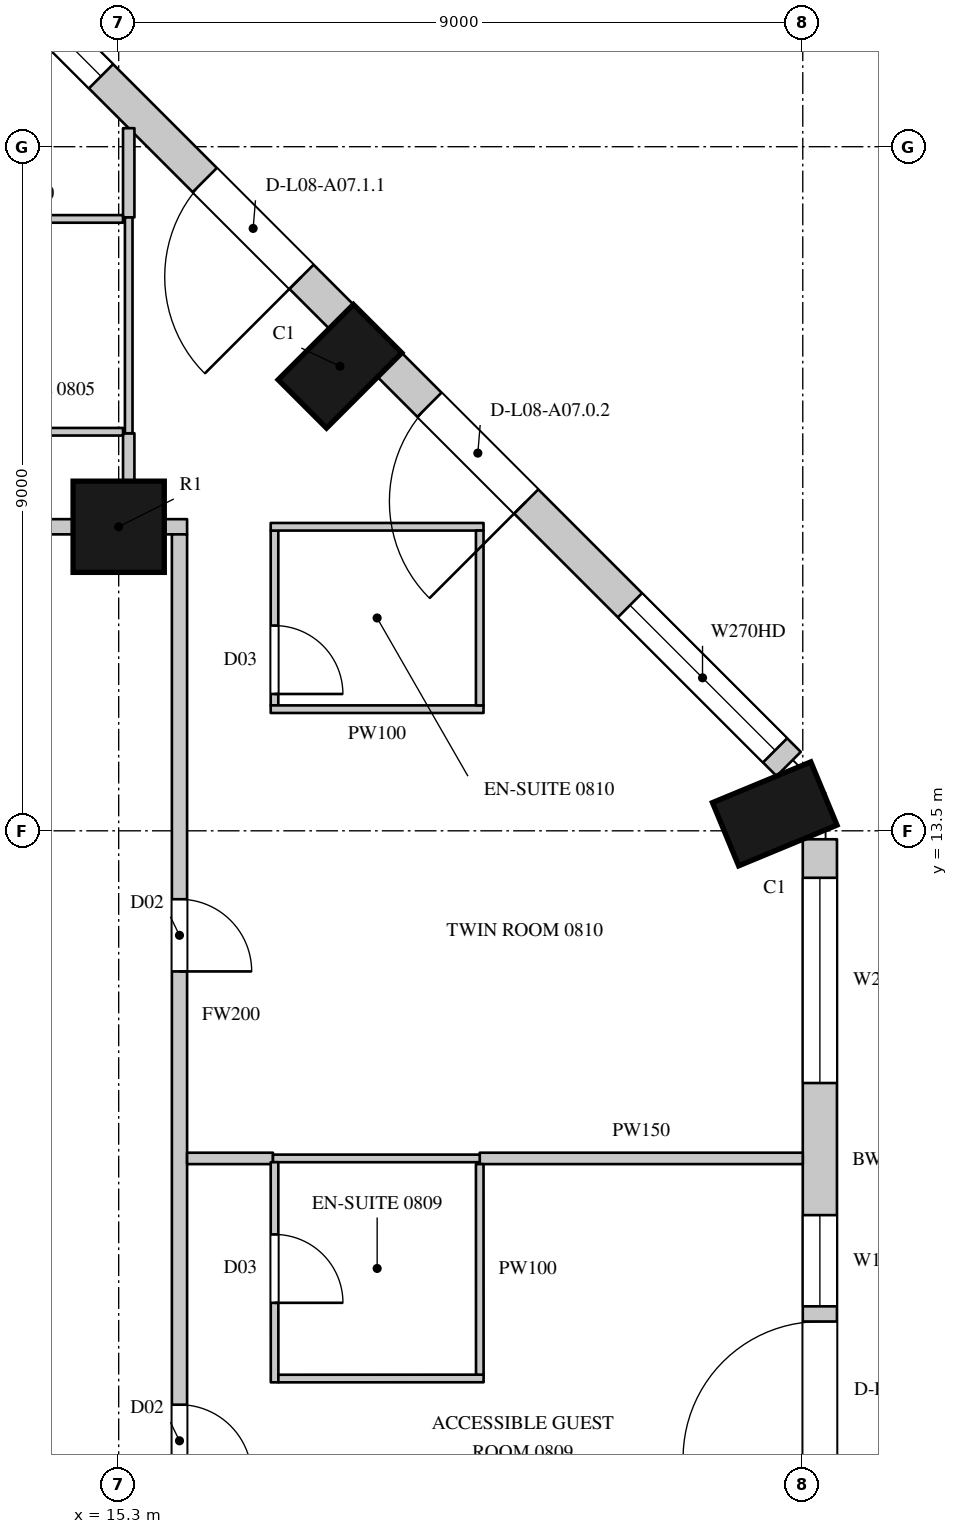
"""IFC4 building model, lengths in metres.
Left out: names, types, materials, properties, quantities, classifications, styles, units other than length and angle.
Written with IfcOpenShell. Run it as: python <this file> out.ifc"""

import sys

from ifc_helpers import new_model, si_unit, direction, frame, frame_2d, origin, origin_2d, place, context, subcontext, project, spatial, rectangle, circle, extrude, element, fill, save


model = new_model("IFC4")
c1 = context("Model", 3, precision=1e-05, world=origin(), true_north=direction((0.0, 1.0)))
c2 = subcontext(c1, "Body", "Model", "MODEL_VIEW")
j1 = project(units=[si_unit("LENGTHUNIT", "METRE"), si_unit("PLANEANGLEUNIT", "RADIAN")], contexts=[c1])
p1 = place(None, origin())
s1 = spatial("IfcSite", under=j1, at=p1, CompositionType="ELEMENT")
p2 = place(p1, origin())
s2 = spatial("IfcBuilding", under=s1, at=p2, CompositionType="ELEMENT")
p3 = place(p2, frame((0.0, 0.0, 59.1)))
s3 = spatial("IfcBuildingStorey", under=s2, at=p3, CompositionType="ELEMENT", Elevation=59.1)
for number, where, z_axis, x_axis in (
    (1, (23.931, 13.723, 0.0), (0.0, 0.0, 1.0), (-0.383, 0.924, 0.0)),
    (2, (18.211, 19.611, 0.0), (0.0, 0.0, 1.0), (-0.707, 0.707, 0.0)),
):
    element("IfcColumn", number, at=place(p3, frame(where, z_axis=z_axis, x_axis=x_axis)), inside=s3, PredefinedType="COLUMN", context=c2, shape_type="SweptSolid", body=[
        extrude(rectangle(XDim=0.9, YDim=1.4, at=origin_2d()), origin(), (0.0, 0.0, 1.0), 3.6),
    ])
p4 = place(p3, frame((15.3, 17.5, 0.0), z_axis=(0.0, 0.0, 1.0), x_axis=(1.0, 0.0, 0.0)))
e3 = element("IfcColumn", 3, at=p4, inside=s3, PredefinedType="COLUMN", context=c2, shape_type="SweptSolid", body=[
    extrude(circle(Radius=0.6, at=origin_2d()), origin(), (0.0, 0.0, 1.0), 3.6),
])
p5 = place(p3, frame((24.525, 4.95, 0.0), z_axis=(0.0, 0.0, 1.0), x_axis=(0.0, 1.0, 0.0)))
e4 = element("IfcWall", 4, at=p5, inside=s3, PredefinedType="SOLIDWALL", context=c2, shape_type="SweptSolid", body=[
    extrude(rectangle(XDim=8.439, YDim=0.45, at=frame_2d((4.219, 0.0))), origin(), (0.0, 0.0, 1.0), 3.3),
])
p6 = place(p5, frame((0.294, 0.0, 0.0)))
e5 = element("IfcOpeningElement", 5, at=p6, cuts=e4, PredefinedType="OPENING", context=c2, shape_type="SweptSolid", body=[
    extrude(rectangle(XDim=1.8, YDim=2.4, at=frame_2d((0.9, 1.2))), frame((0.0, 0.235, 0.0), z_axis=(0.0, -1.0, 0.0), x_axis=(1.0, 0.0, 0.0)), (0.0, 0.0, 1.0), 0.47),
])
p7 = place(p5, frame((2.294, 0.0, 1.05)))
e6 = element("IfcOpeningElement", 6, at=p7, cuts=e4, PredefinedType="OPENING", context=c2, shape_type="SweptSolid", body=[
    extrude(rectangle(XDim=1.2, YDim=2.0, at=frame_2d((0.6, 1.0))), frame((0.0, 0.235, 0.0), z_axis=(0.0, -1.0, 0.0), x_axis=(1.0, 0.0, 0.0)), (0.0, 0.0, 1.0), 0.47),
])
p8 = place(p5, frame((5.232, 0.0, 1.05)))
e7 = element("IfcOpeningElement", 7, at=p8, cuts=e4, PredefinedType="OPENING", context=c2, shape_type="SweptSolid", body=[
    extrude(rectangle(XDim=2.7, YDim=2.0, at=frame_2d((1.35, 1.0))), frame((0.0, 0.235, 0.0), z_axis=(0.0, -1.0, 0.0), x_axis=(1.0, 0.0, 0.0)), (0.0, 0.0, 1.0), 0.47),
])
p9 = place(p3, frame((24.115, 14.379, 0.0), z_axis=(0.0, 0.0, 1.0), x_axis=(-0.707106781187, 0.707106781187, 0.0)))
e8 = element("IfcWall", 8, at=p9, inside=s3, PredefinedType="SOLIDWALL", context=c2, shape_type="SweptSolid", body=[
    extrude(rectangle(XDim=7.424, YDim=0.45, at=frame_2d((3.712, 0.0))), origin(), (0.0, 0.0, 1.0), 3.3),
])
p10 = place(p9, frame((0.253, 0.0, 1.05)))
e9 = element("IfcOpeningElement", 9, at=p10, cuts=e8, PredefinedType="OPENING", context=c2, shape_type="SweptSolid", body=[
    extrude(rectangle(XDim=2.7, YDim=2.0, at=frame_2d((1.35, 1.0))), frame((0.0, 0.235, 0.0), z_axis=(0.0, -1.0, 0.0), x_axis=(1.0, 0.0, 0.0)), (0.0, 0.0, 1.0), 0.47),
])
p11 = place(p9, frame((4.884, 0.0, 0.0)))
e10 = element("IfcOpeningElement", 10, at=p11, cuts=e8, PredefinedType="OPENING", context=c2, shape_type="SweptSolid", body=[
    extrude(rectangle(XDim=1.8, YDim=2.4, at=frame_2d((0.9, 1.2))), frame((0.0, 0.235, 0.0), z_axis=(0.0, -1.0, 0.0), x_axis=(1.0, 0.0, 0.0)), (0.0, 0.0, 1.0), 0.47),
])
p12 = place(p3, frame((18.229, 20.265, 0.0), z_axis=(0.0, 0.0, 1.0), x_axis=(-0.707106781187, 0.707106781187, 0.0)))
e11 = element("IfcWall", 11, at=p12, inside=s3, PredefinedType="SOLIDWALL", context=c2, shape_type="SweptSolid", body=[
    extrude(rectangle(XDim=7.424, YDim=0.45, at=frame_2d((3.712, 0.0))), origin(), (0.0, 0.0, 1.0), 3.3),
])
p13 = place(p12, frame((0.74, 0.0, 0.0)))
e12 = element("IfcOpeningElement", 12, at=p13, cuts=e11, PredefinedType="OPENING", context=c2, shape_type="SweptSolid", body=[
    extrude(rectangle(XDim=1.8, YDim=2.4, at=frame_2d((0.9, 1.2))), frame((0.0, 0.235, 0.0), z_axis=(0.0, -1.0, 0.0), x_axis=(1.0, 0.0, 0.0)), (0.0, 0.0, 1.0), 0.47),
])
p14 = place(p12, frame((4.471, 0.0, 1.05)))
e13 = element("IfcOpeningElement", 13, at=p14, cuts=e11, PredefinedType="OPENING", context=c2, shape_type="SweptSolid", body=[
    extrude(rectangle(XDim=2.7, YDim=2.0, at=frame_2d((1.35, 1.0))), frame((0.0, 0.235, 0.0), z_axis=(0.0, -1.0, 0.0), x_axis=(1.0, 0.0, 0.0)), (0.0, 0.0, 1.0), 0.47),
])
p15 = place(p3, frame((23.15, 16.864, 0.0), z_axis=(0.0, 0.0, 1.0), x_axis=(-0.707106781187, 0.707106781187, 0.0)))
e14 = element("IfcWall", 14, at=p15, inside=s3, PredefinedType="SOLIDWALL", context=c2, shape_type="SweptSolid", body=[
    extrude(rectangle(XDim=1.445, YDim=0.45, at=frame_2d((0.722, 0.0))), origin(), (0.0, 0.0, 1.0), 0.6),
])
p16 = place(p3, frame((19.937, 20.078, 0.0), z_axis=(0.0, 0.0, 1.0), x_axis=(-0.707106781187, 0.707106781187, 0.0)))
e15 = element("IfcWall", 15, at=p16, inside=s3, PredefinedType="SOLIDWALL", context=c2, shape_type="SweptSolid", body=[
    extrude(rectangle(XDim=1.781, YDim=0.45, at=frame_2d((0.89, 0.0))), origin(), (0.0, 0.0, 1.0), 0.6),
])
p17 = place(p3, frame((16.486, 23.529, 0.0), z_axis=(0.0, 0.0, 1.0), x_axis=(-0.707022305137, 0.707191247145, 0.0)))
e16 = element("IfcWall", 16, at=p17, inside=s3, PredefinedType="SOLIDWALL", context=c2, shape_type="SweptSolid", body=[
    extrude(rectangle(XDim=1.445, YDim=0.45, at=frame_2d((0.723, 0.0))), origin(), (0.0, 0.0, 1.0), 0.6),
])
p18 = place(p3, frame((6.9, 17.5, 0.0), z_axis=(0.0, 0.0, 1.0), x_axis=(1.0, 0.0, 0.0)))
e17 = element("IfcWall", 17, at=p18, inside=s3, PredefinedType="PARTITIONING", context=c2, shape_type="SweptSolid", body=[
    extrude(rectangle(XDim=7.8, YDim=0.2, at=frame_2d((3.9, 0.0))), origin(), (0.0, 0.0, 1.0), 2.75),
])
p19 = place(p18, frame((1.45, 0.0, 0.0)))
e18 = element("IfcOpeningElement", 18, at=p19, cuts=e17, PredefinedType="OPENING", context=c2, shape_type="SweptSolid", body=[
    extrude(rectangle(XDim=1.1, YDim=2.4, at=frame_2d((0.55, 1.2))), frame((0.0, 0.11, 0.0), z_axis=(0.0, -1.0, 0.0), x_axis=(1.0, 0.0, 0.0)), (0.0, 0.0, 1.0), 0.22),
])
p20 = place(p3, frame((15.9, 17.5, 0.0), z_axis=(0.0, 0.0, 1.0), x_axis=(1.0, 0.0, 0.0)))
e19 = element("IfcWall", 19, at=p20, inside=s3, PredefinedType="PARTITIONING", context=c2, shape_type="SweptSolid", body=[
    extrude(rectangle(XDim=0.3, YDim=0.2, at=frame_2d((0.15, 0.0))), origin(), (0.0, 0.0, 1.0), 3.3),
])
p21 = place(p3, frame((16.1, 4.75, 0.0), z_axis=(0.0, 0.0, 1.0), x_axis=(0.0, 1.0, 0.0)))
e20 = element("IfcWall", 20, at=p21, inside=s3, PredefinedType="PARTITIONING", context=c2, shape_type="SweptSolid", body=[
    extrude(rectangle(XDim=12.65, YDim=0.2, at=frame_2d((6.325, 0.0))), origin(), (0.0, 0.0, 1.0), 3.3),
])
p22 = place(p21, frame((0.25, 0.0, 0.0)))
e21 = element("IfcOpeningElement", 21, at=p22, cuts=e20, PredefinedType="OPENING", context=c2, shape_type="SweptSolid", body=[
    extrude(rectangle(XDim=0.95, YDim=2.2, at=frame_2d((0.475, 1.1))), frame((0.0, 0.11, 0.0), z_axis=(0.0, -1.0, 0.0), x_axis=(1.0, 0.0, 0.0)), (0.0, 0.0, 1.0), 0.22),
])
p23 = place(p21, frame((6.9, 0.0, 0.0)))
e22 = element("IfcOpeningElement", 22, at=p23, cuts=e20, PredefinedType="OPENING", context=c2, shape_type="SweptSolid", body=[
    extrude(rectangle(XDim=0.95, YDim=2.2, at=frame_2d((0.475, 1.1))), frame((0.0, 0.11, 0.0), z_axis=(0.0, -1.0, 0.0), x_axis=(1.0, 0.0, 0.0)), (0.0, 0.0, 1.0), 0.22),
])
p24 = place(p3, frame((15.432, 18.094, 0.0), z_axis=(0.0, 0.0, 1.0), x_axis=(0.0, 1.0, 0.0)))
e23 = element("IfcWall", 23, at=p24, inside=s3, PredefinedType="PARTITIONING", context=c2, shape_type="SweptSolid", body=[
    extrude(rectangle(XDim=0.636, YDim=0.15, at=frame_2d((0.318, 0.0))), origin(), (0.0, 0.0, 1.0), 3.3),
])
p25 = place(p3, frame((15.432, 21.57, 0.0), z_axis=(0.0, 0.0, 1.0), x_axis=(0.0, 1.0, 0.0)))
e24 = element("IfcWall", 24, at=p25, inside=s3, PredefinedType="PARTITIONING", context=c2, shape_type="SweptSolid", body=[
    extrude(rectangle(XDim=1.174, YDim=0.15, at=frame_2d((0.587, 0.0))), origin(), (0.0, 0.0, 1.0), 3.3),
])
p26 = place(p3, frame((16.2, 9.19, 0.0), z_axis=(0.0, 0.0, 1.0), x_axis=(1.0, 0.0, 0.0)))
e25 = element("IfcWall", 25, at=p26, inside=s3, PredefinedType="PARTITIONING", context=c2, shape_type="SweptSolid", body=[
    extrude(rectangle(XDim=1.13, YDim=0.15, at=frame_2d((0.565, 0.0))), origin(), (0.0, 0.0, 1.0), 2.65),
])
p27 = place(p3, frame((20.05, 9.19, 0.0), z_axis=(0.0, 0.0, 1.0), x_axis=(1.0, 0.0, 0.0)))
e26 = element("IfcWall", 26, at=p27, inside=s3, PredefinedType="PARTITIONING", context=c2, shape_type="SweptSolid", body=[
    extrude(rectangle(XDim=4.25, YDim=0.15, at=frame_2d((2.125, 0.0))), origin(), (0.0, 0.0, 1.0), 2.65),
])
for number, where, z_axis, x_axis in (
    (27, (12.786, 18.75, 0.0), (0.0, 0.0, 1.0), (1.0, 0.0, 0.0)),
    (28, (12.786, 21.55, 0.0), (0.0, 0.0, 1.0), (1.0, 0.0, 0.0)),
):
    element("IfcWall", number, at=place(p3, frame(where, z_axis=z_axis, x_axis=x_axis)), inside=s3, PredefinedType="PARTITIONING", context=c2, shape_type="SweptSolid", body=[
        extrude(rectangle(XDim=2.571, YDim=0.1, at=frame_2d((1.286, 0.0))), origin(), (0.0, 0.0, 1.0), 3.3),
    ])
p28 = place(p3, frame((15.432, 18.73, 0.0), z_axis=(0.0, 0.0, 1.0), x_axis=(0.0, 1.0, 0.0)))
e29 = element("IfcWall", 29, at=p28, inside=s3, PredefinedType="PARTITIONING", context=c2, shape_type="SweptSolid", body=[
    extrude(rectangle(XDim=2.84, YDim=0.1, at=frame_2d((1.42, 0.0))), origin(), (0.0, 0.0, 1.0), 3.3),
])
p29 = place(p3, frame((17.33, 9.19, 0.0), z_axis=(0.0, 0.0, 1.0), x_axis=(1.0, 0.0, 0.0)))
e30 = element("IfcWall", 30, at=p29, inside=s3, PredefinedType="PARTITIONING", context=c2, shape_type="SweptSolid", body=[
    extrude(rectangle(XDim=2.72, YDim=0.1, at=frame_2d((1.36, 0.0))), origin(), (0.0, 0.0, 1.0), 2.65),
])
p30 = place(p3, frame((17.35, 9.14, 0.0), z_axis=(0.0, 0.0, 1.0), x_axis=(0.000337211244, -0.999999943144, 0.0)))
e31 = element("IfcWall", 31, at=p30, inside=s3, PredefinedType="PARTITIONING", context=c2, shape_type="SweptSolid", body=[
    extrude(rectangle(XDim=2.896, YDim=0.1, at=frame_2d((1.448, 0.0))), origin(), (0.0, 0.0, 1.0), 3.3),
])
p31 = place(p30, frame((0.95, 0.0, 0.0)))
e32 = element("IfcOpeningElement", 32, at=p31, cuts=e31, PredefinedType="OPENING", context=c2, shape_type="SweptSolid", body=[
    extrude(rectangle(XDim=0.9, YDim=2.2, at=frame_2d((0.45, 1.1))), frame((0.0, 0.06, 0.0), z_axis=(0.0, -1.0, 0.0), x_axis=(1.0, 0.0, 0.0)), (0.0, 0.0, 1.0), 0.12),
])
p32 = place(p3, frame((17.35, 15.15, 0.0), z_axis=(0.0, 0.0, 1.0), x_axis=(0.0, 1.0, 0.0)))
e33 = element("IfcWall", 33, at=p32, inside=s3, PredefinedType="PARTITIONING", context=c2, shape_type="SweptSolid", body=[
    extrude(rectangle(XDim=2.3, YDim=0.1, at=frame_2d((1.15, 0.0))), origin(), (0.0, 0.0, 1.0), 3.3),
])
p33 = place(p32, frame((0.15, 0.0, 0.0)))
e34 = element("IfcOpeningElement", 34, at=p33, cuts=e33, PredefinedType="OPENING", context=c2, shape_type="SweptSolid", body=[
    extrude(rectangle(XDim=0.9, YDim=2.2, at=frame_2d((0.45, 1.1))), frame((0.0, 0.06, 0.0), z_axis=(0.0, -1.0, 0.0), x_axis=(1.0, 0.0, 0.0)), (0.0, 0.0, 1.0), 0.12),
])
for number, where, z_axis, x_axis in (
    (35, (17.3, 15.1, 0.0), (0.0, 0.0, 1.0), (1.0, 0.0, 0.0)),
    (36, (17.3, 17.5, 0.0), (0.0, 0.0, 1.0), (1.0, 0.0, 0.0)),
):
    element("IfcWall", number, at=place(p3, frame(where, z_axis=z_axis, x_axis=x_axis)), inside=s3, PredefinedType="PARTITIONING", context=c2, shape_type="SweptSolid", body=[
        extrude(rectangle(XDim=2.8, YDim=0.1, at=frame_2d((1.4, 0.0))), origin(), (0.0, 0.0, 1.0), 3.3),
    ])
p34 = place(p3, frame((17.401, 6.294, 0.0), z_axis=(0.0, 0.0, 1.0), x_axis=(0.9999999346, 0.000361663629, 0.0)))
e37 = element("IfcWall", 37, at=p34, inside=s3, PredefinedType="PARTITIONING", context=c2, shape_type="SweptSolid", body=[
    extrude(rectangle(XDim=2.7, YDim=0.1, at=frame_2d((1.35, 0.0))), origin(), (0.0, 0.0, 1.0), 3.3),
])
p35 = place(p3, frame((20.05, 9.115, 0.0), z_axis=(0.0, 0.0, 1.0), x_axis=(0.000352547131, -0.999999937855, 0.0)))
e38 = element("IfcWall", 38, at=p35, inside=s3, PredefinedType="PARTITIONING", context=c2, shape_type="SweptSolid", body=[
    extrude(rectangle(XDim=2.77, YDim=0.1, at=frame_2d((1.385, 0.0))), origin(), (0.0, 0.0, 1.0), 3.3),
])
p36 = place(p3, frame((20.05, 15.15, 0.0), z_axis=(0.0, 0.0, 1.0), x_axis=(0.0, 1.0, 0.0)))
e39 = element("IfcWall", 39, at=p36, inside=s3, PredefinedType="PARTITIONING", context=c2, shape_type="SweptSolid", body=[
    extrude(rectangle(XDim=2.3, YDim=0.1, at=frame_2d((1.15, 0.0))), origin(), (0.0, 0.0, 1.0), 3.3),
])
p37 = place(p6, origin())
e40 = element("IfcDoor", 40, at=p37, inside=s3, OperationType="SLIDING_TO_LEFT", PredefinedType="DOOR", context=c2, shape_type="SweptSolid", body=[
    extrude(rectangle(XDim=1.8, YDim=2.4, at=frame_2d((0.9, 1.2))), frame((0.0, 0.13, 0.0), z_axis=(0.0, -1.0, 0.0), x_axis=(1.0, 0.0, 0.0)), (0.0, 0.0, 1.0), 0.05),
])
fill(e5, e40)
p38 = place(p7, origin())
e41 = element("IfcWindow", 41, at=p38, inside=s3, PartitioningType="SINGLE_PANEL", PredefinedType="WINDOW", context=c2, shape_type="SweptSolid", body=[
    extrude(rectangle(XDim=1.2, YDim=2.0, at=frame_2d((0.6, 1.0))), frame((0.0, 0.135, 0.0), z_axis=(0.0, -1.0, 0.0), x_axis=(1.0, 0.0, 0.0)), (0.0, 0.0, 1.0), 0.06),
])
fill(e6, e41)
p39 = place(p8, origin())
e42 = element("IfcWindow", 42, at=p39, inside=s3, PartitioningType="SINGLE_PANEL", PredefinedType="WINDOW", context=c2, shape_type="SweptSolid", body=[
    extrude(rectangle(XDim=2.7, YDim=2.0, at=frame_2d((1.35, 1.0))), frame((0.0, 0.135, 0.0), z_axis=(0.0, -1.0, 0.0), x_axis=(1.0, 0.0, 0.0)), (0.0, 0.0, 1.0), 0.06),
])
fill(e7, e42)
p40 = place(p10, origin())
e43 = element("IfcWindow", 43, at=p40, inside=s3, PartitioningType="SINGLE_PANEL", PredefinedType="WINDOW", context=c2, shape_type="SweptSolid", body=[
    extrude(rectangle(XDim=2.7, YDim=2.0, at=frame_2d((1.35, 1.0))), frame((0.0, 0.135, 0.0), z_axis=(0.0, -1.0, 0.0), x_axis=(1.0, 0.0, 0.0)), (0.0, 0.0, 1.0), 0.06),
])
fill(e9, e43)
p41 = place(p11, origin())
e44 = element("IfcDoor", 44, at=p41, inside=s3, OperationType="SLIDING_TO_LEFT", PredefinedType="DOOR", context=c2, shape_type="SweptSolid", body=[
    extrude(rectangle(XDim=1.8, YDim=2.4, at=frame_2d((0.9, 1.2))), frame((0.0, 0.13, 0.0), z_axis=(0.0, -1.0, 0.0), x_axis=(1.0, 0.0, 0.0)), (0.0, 0.0, 1.0), 0.05),
])
fill(e10, e44)
p42 = place(p13, origin())
e45 = element("IfcDoor", 45, at=p42, inside=s3, OperationType="SLIDING_TO_LEFT", PredefinedType="DOOR", context=c2, shape_type="SweptSolid", body=[
    extrude(rectangle(XDim=1.8, YDim=2.4, at=frame_2d((0.9, 1.2))), frame((0.0, 0.13, 0.0), z_axis=(0.0, -1.0, 0.0), x_axis=(1.0, 0.0, 0.0)), (0.0, 0.0, 1.0), 0.05),
])
fill(e12, e45)
p43 = place(p14, origin())
e46 = element("IfcWindow", 46, at=p43, inside=s3, PartitioningType="SINGLE_PANEL", PredefinedType="WINDOW", context=c2, shape_type="SweptSolid", body=[
    extrude(rectangle(XDim=2.7, YDim=2.0, at=frame_2d((1.35, 1.0))), frame((0.0, 0.135, 0.0), z_axis=(0.0, -1.0, 0.0), x_axis=(1.0, 0.0, 0.0)), (0.0, 0.0, 1.0), 0.06),
])
fill(e13, e46)
p44 = place(p22, origin())
e47 = element("IfcDoor", 47, at=p44, inside=s3, OperationType="SINGLE_SWING_RIGHT", PredefinedType="DOOR", context=c2, shape_type="SweptSolid", body=[
    extrude(rectangle(XDim=0.95, YDim=2.2, at=frame_2d((0.475, 1.1))), frame((0.0, 0.025, 0.0), z_axis=(0.0, -1.0, 0.0), x_axis=(1.0, 0.0, 0.0)), (0.0, 0.0, 1.0), 0.05),
])
fill(e21, e47)
p45 = place(p31, origin())
e48 = element("IfcDoor", 48, at=p45, inside=s3, OperationType="SINGLE_SWING_RIGHT", PredefinedType="DOOR", context=c2, shape_type="SweptSolid", body=[
    extrude(rectangle(XDim=0.9, YDim=2.2, at=frame_2d((0.45, 1.1))), frame((0.0, 0.025, 0.0), z_axis=(0.0, -1.0, 0.0), x_axis=(1.0, 0.0, 0.0)), (0.0, 0.0, 1.0), 0.05),
])
fill(e32, e48)
p46 = place(p23, origin())
e49 = element("IfcDoor", 49, at=p46, inside=s3, OperationType="SINGLE_SWING_RIGHT", PredefinedType="DOOR", context=c2, shape_type="SweptSolid", body=[
    extrude(rectangle(XDim=0.95, YDim=2.2, at=frame_2d((0.475, 1.1))), frame((0.0, 0.025, 0.0), z_axis=(0.0, -1.0, 0.0), x_axis=(1.0, 0.0, 0.0)), (0.0, 0.0, 1.0), 0.05),
])
fill(e22, e49)
p47 = place(p33, origin())
e50 = element("IfcDoor", 50, at=p47, inside=s3, OperationType="SINGLE_SWING_RIGHT", PredefinedType="DOOR", context=c2, shape_type="SweptSolid", body=[
    extrude(rectangle(XDim=0.9, YDim=2.2, at=frame_2d((0.45, 1.1))), frame((0.0, 0.025, 0.0), z_axis=(0.0, -1.0, 0.0), x_axis=(1.0, 0.0, 0.0)), (0.0, 0.0, 1.0), 0.05),
])
fill(e34, e50)
save(model, sys.argv[1])
